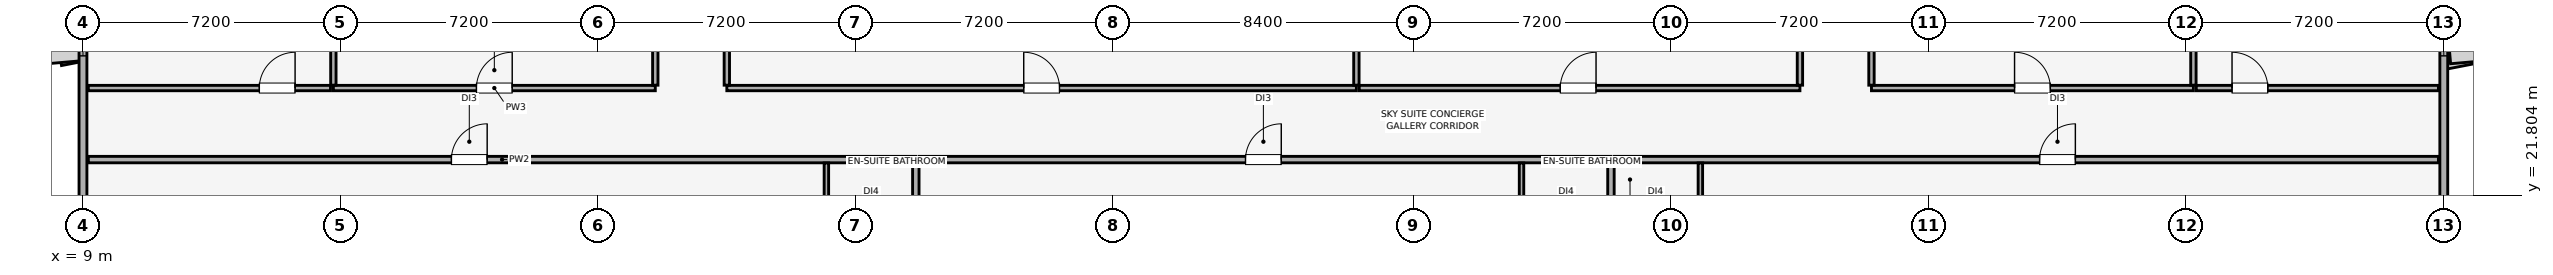
"""IFC4 building model, lengths in metres.
Left out: names, types, materials, properties, quantities, classifications, styles, units other than length and angle.
Written with IfcOpenShell. Run it as: python <this file> out.ifc"""

import sys

from ifc_helpers import new_model, si_unit, direction, frame, frame_2d, origin, place, context, subcontext, project, spatial, rectangle, extrude, element, fill, save


model = new_model("IFC4")
c1 = context("Model", 3, precision=1e-05, world=origin(), true_north=direction((0.0, 1.0)))
c2 = subcontext(c1, "Body", "Model", "MODEL_VIEW")
j1 = project(units=[si_unit("LENGTHUNIT", "METRE"), si_unit("PLANEANGLEUNIT", "RADIAN")], contexts=[c1])
p1 = place(None, origin())
s1 = spatial("IfcSite", under=j1, at=p1, CompositionType="ELEMENT")
p2 = place(p1, origin())
s2 = spatial("IfcBuilding", under=s1, at=p2, CompositionType="ELEMENT")
p3 = place(p2, frame((0.0, 0.0, 290.3)))
s3 = spatial("IfcBuildingStorey", under=s2, at=p3, CompositionType="ELEMENT", Elevation=290.3)
p4 = place(p3, frame((75.0, 10.6, 0.0), z_axis=(0.0, 0.0, 1.0), x_axis=(0.0, 1.0, 0.0)))
e1 = element("IfcWall", 1, at=p4, inside=s3, PredefinedType="SOLIDWALL", context=c2, shape_type="SweptSolid", body=[
    extrude(rectangle(XDim=34.8, YDim=0.22, at=frame_2d((17.4, 0.0))), origin(), (0.0, 0.0, 1.0), 3.22),
])
p5 = place(p4, frame((0.885, 0.0, 0.85)))
e2 = element("IfcOpeningElement", 2, at=p5, cuts=e1, PredefinedType="OPENING", context=c2, shape_type="SweptSolid", body=[
    extrude(rectangle(XDim=2.4, YDim=1.5, at=frame_2d((1.2, 0.75))), frame((0.0, 0.12, 0.0), z_axis=(0.0, -1.0, 0.0), x_axis=(1.0, 0.0, 0.0)), (0.0, 0.0, 1.0), 0.24),
])
p6 = place(p4, frame((6.7, 0.0, 0.85)))
e3 = element("IfcOpeningElement", 3, at=p6, cuts=e1, PredefinedType="OPENING", context=c2, shape_type="SweptSolid", body=[
    extrude(rectangle(XDim=3.6, YDim=1.65, at=frame_2d((1.8, 0.825))), frame((0.0, 0.12, 0.0), z_axis=(0.0, -1.0, 0.0), x_axis=(1.0, 0.0, 0.0)), (0.0, 0.0, 1.0), 0.24),
])
p7 = place(p4, frame((15.1, 0.0, 0.85)))
e4 = element("IfcOpeningElement", 4, at=p7, cuts=e1, PredefinedType="OPENING", context=c2, shape_type="SweptSolid", body=[
    extrude(rectangle(XDim=2.4, YDim=1.5, at=frame_2d((1.2, 0.75))), frame((0.0, 0.12, 0.0), z_axis=(0.0, -1.0, 0.0), x_axis=(1.0, 0.0, 0.0)), (0.0, 0.0, 1.0), 0.24),
])
p8 = place(p4, frame((20.015, 0.0, 0.85)))
e5 = element("IfcOpeningElement", 5, at=p8, cuts=e1, PredefinedType="OPENING", context=c2, shape_type="SweptSolid", body=[
    extrude(rectangle(XDim=3.0, YDim=1.5, at=frame_2d((1.5, 0.75))), frame((0.0, 0.12, 0.0), z_axis=(0.0, -1.0, 0.0), x_axis=(1.0, 0.0, 0.0)), (0.0, 0.0, 1.0), 0.24),
])
p9 = place(p4, frame((24.785, 0.0, 0.85)))
e6 = element("IfcOpeningElement", 6, at=p9, cuts=e1, PredefinedType="OPENING", context=c2, shape_type="SweptSolid", body=[
    extrude(rectangle(XDim=3.0, YDim=1.5, at=frame_2d((1.5, 0.75))), frame((0.0, 0.12, 0.0), z_axis=(0.0, -1.0, 0.0), x_axis=(1.0, 0.0, 0.0)), (0.0, 0.0, 1.0), 0.24),
])
p10 = place(p4, frame((30.215, 0.0, 0.85)))
e7 = element("IfcOpeningElement", 7, at=p10, cuts=e1, PredefinedType="OPENING", context=c2, shape_type="SweptSolid", body=[
    extrude(rectangle(XDim=3.6, YDim=1.65, at=frame_2d((1.8, 0.825))), frame((0.0, 0.12, 0.0), z_axis=(0.0, -1.0, 0.0), x_axis=(1.0, 0.0, 0.0)), (0.0, 0.0, 1.0), 0.24),
])
p11 = place(p3, frame((9.0, 45.4, 0.0), z_axis=(0.0, 0.0, 1.0), x_axis=(0.0, -1.0, 0.0)))
e8 = element("IfcWall", 8, at=p11, inside=s3, PredefinedType="SOLIDWALL", context=c2, shape_type="SweptSolid", body=[
    extrude(rectangle(XDim=34.8, YDim=0.22, at=frame_2d((17.4, 0.0))), origin(), (0.0, 0.0, 1.0), 3.22),
])
p12 = place(p11, frame((31.515, 0.0, 0.85)))
e9 = element("IfcOpeningElement", 9, at=p12, cuts=e8, PredefinedType="OPENING", context=c2, shape_type="SweptSolid", body=[
    extrude(rectangle(XDim=2.4, YDim=1.5, at=frame_2d((1.2, 0.75))), frame((0.0, 0.12, 0.0), z_axis=(0.0, -1.0, 0.0), x_axis=(1.0, 0.0, 0.0)), (0.0, 0.0, 1.0), 0.24),
])
p13 = place(p11, frame((24.5, 0.0, 0.85)))
e10 = element("IfcOpeningElement", 10, at=p13, cuts=e8, PredefinedType="OPENING", context=c2, shape_type="SweptSolid", body=[
    extrude(rectangle(XDim=3.6, YDim=1.65, at=frame_2d((1.8, 0.825))), frame((0.0, 0.12, 0.0), z_axis=(0.0, -1.0, 0.0), x_axis=(1.0, 0.0, 0.0)), (0.0, 0.0, 1.0), 0.24),
])
p14 = place(p11, frame((17.3, 0.0, 0.85)))
e11 = element("IfcOpeningElement", 11, at=p14, cuts=e8, PredefinedType="OPENING", context=c2, shape_type="SweptSolid", body=[
    extrude(rectangle(XDim=2.4, YDim=1.5, at=frame_2d((1.2, 0.75))), frame((0.0, 0.12, 0.0), z_axis=(0.0, -1.0, 0.0), x_axis=(1.0, 0.0, 0.0)), (0.0, 0.0, 1.0), 0.24),
])
p15 = place(p11, frame((11.785, 0.0, 0.85)))
e12 = element("IfcOpeningElement", 12, at=p15, cuts=e8, PredefinedType="OPENING", context=c2, shape_type="SweptSolid", body=[
    extrude(rectangle(XDim=3.0, YDim=1.5, at=frame_2d((1.5, 0.75))), frame((0.0, 0.12, 0.0), z_axis=(0.0, -1.0, 0.0), x_axis=(1.0, 0.0, 0.0)), (0.0, 0.0, 1.0), 0.24),
])
p16 = place(p11, frame((7.015, 0.0, 0.85)))
e13 = element("IfcOpeningElement", 13, at=p16, cuts=e8, PredefinedType="OPENING", context=c2, shape_type="SweptSolid", body=[
    extrude(rectangle(XDim=3.0, YDim=1.5, at=frame_2d((1.5, 0.75))), frame((0.0, 0.12, 0.0), z_axis=(0.0, -1.0, 0.0), x_axis=(1.0, 0.0, 0.0)), (0.0, 0.0, 1.0), 0.24),
])
p17 = place(p11, frame((0.985, 0.0, 0.85)))
e14 = element("IfcOpeningElement", 14, at=p17, cuts=e8, PredefinedType="OPENING", context=c2, shape_type="SweptSolid", body=[
    extrude(rectangle(XDim=3.6, YDim=1.65, at=frame_2d((1.8, 0.825))), frame((0.0, 0.12, 0.0), z_axis=(0.0, -1.0, 0.0), x_axis=(1.0, 0.0, 0.0)), (0.0, 0.0, 1.0), 0.24),
])
p18 = place(p3, frame((9.15, 22.8, 0.0), z_axis=(0.0, 0.0, 1.0), x_axis=(1.0, 0.0, 0.0)))
e15 = element("IfcWall", 15, at=p18, inside=s3, PredefinedType="PARTITIONING", context=c2, shape_type="SweptSolid", body=[
    extrude(rectangle(XDim=23.133, YDim=0.18, at=frame_2d((11.567, 0.0))), origin(), (0.0, 0.0, 1.0), 4.02),
])
p19 = place(p18, frame((10.15, 0.0, 0.0)))
e16 = element("IfcOpeningElement", 16, at=p19, cuts=e15, PredefinedType="OPENING", context=c2, shape_type="SweptSolid", body=[
    extrude(rectangle(XDim=1.0, YDim=2.15, at=frame_2d((0.5, 1.075))), frame((0.0, 0.1, 0.0), z_axis=(0.0, -1.0, 0.0), x_axis=(1.0, 0.0, 0.0)), (0.0, 0.0, 1.0), 0.2),
])
p20 = place(p3, frame((32.283, 7.15, 0.0), z_axis=(0.0, 0.0, 1.0), x_axis=(0.0, 1.0, 0.0)))
e17 = element("IfcWall", 17, at=p20, inside=s3, PredefinedType="PARTITIONING", context=c2, shape_type="SweptSolid", body=[
    extrude(rectangle(XDim=15.555, YDim=0.18, at=frame_2d((7.778, 0.0))), origin(), (0.0, 0.0, 1.0), 4.02),
])
p21 = place(p3, frame((29.783, 20.317, 0.0), z_axis=(0.0, 0.0, 1.0), x_axis=(0.0, 1.0, 0.0)))
e18 = element("IfcWall", 18, at=p21, inside=s3, PredefinedType="PARTITIONING", context=c2, shape_type="SweptSolid", body=[
    extrude(rectangle(XDim=2.388, YDim=0.125, at=frame_2d((1.194, 0.0))), origin(), (0.0, 0.0, 1.0), 4.02),
])
p22 = place(p3, frame((32.378, 22.8, 0.0), z_axis=(0.0, 0.0, 1.0), x_axis=(1.0, 0.0, 0.0)))
e19 = element("IfcWall", 19, at=p22, inside=s3, PredefinedType="PARTITIONING", context=c2, shape_type="SweptSolid", body=[
    extrude(rectangle(XDim=19.338, YDim=0.18, at=frame_2d((9.669, 0.0))), origin(), (0.0, 0.0, 1.0), 4.02),
])
p23 = place(p22, frame((9.122, 0.0, 0.0)))
e20 = element("IfcOpeningElement", 20, at=p23, cuts=e19, PredefinedType="OPENING", context=c2, shape_type="SweptSolid", body=[
    extrude(rectangle(XDim=1.0, YDim=2.15, at=frame_2d((0.5, 1.075))), frame((0.0, 0.1, 0.0), z_axis=(0.0, -1.0, 0.0), x_axis=(1.0, 0.0, 0.0)), (0.0, 0.0, 1.0), 0.2),
])
p24 = place(p3, frame((51.717, 7.15, 0.0), z_axis=(0.0, 0.0, 1.0), x_axis=(0.0, 1.0, 0.0)))
e21 = element("IfcWall", 21, at=p24, inside=s3, PredefinedType="PARTITIONING", context=c2, shape_type="SweptSolid", body=[
    extrude(rectangle(XDim=15.555, YDim=0.18, at=frame_2d((7.778, 0.0))), origin(), (0.0, 0.0, 1.0), 4.02),
])
p25 = place(p3, frame((49.217, 20.317, 0.0), z_axis=(0.0, 0.0, 1.0), x_axis=(0.0, 1.0, 0.0)))
e22 = element("IfcWall", 22, at=p25, inside=s3, PredefinedType="PARTITIONING", context=c2, shape_type="SweptSolid", body=[
    extrude(rectangle(XDim=2.388, YDim=0.125, at=frame_2d((1.194, 0.0))), origin(), (0.0, 0.0, 1.0), 4.02),
])
p26 = place(p3, frame((51.812, 22.8, 0.0), z_axis=(0.0, 0.0, 1.0), x_axis=(1.0, 0.0, 0.0)))
e23 = element("IfcWall", 23, at=p26, inside=s3, PredefinedType="PARTITIONING", context=c2, shape_type="SweptSolid", body=[
    extrude(rectangle(XDim=23.038, YDim=0.18, at=frame_2d((11.519, 0.0))), origin(), (0.0, 0.0, 1.0), 4.02),
])
p27 = place(p26, frame((11.888, 0.0, 0.0)))
e24 = element("IfcOpeningElement", 24, at=p27, cuts=e23, PredefinedType="OPENING", context=c2, shape_type="SweptSolid", body=[
    extrude(rectangle(XDim=1.0, YDim=2.15, at=frame_2d((0.5, 1.075))), frame((0.0, 0.1, 0.0), z_axis=(0.0, -1.0, 0.0), x_axis=(1.0, 0.0, 0.0)), (0.0, 0.0, 1.0), 0.2),
])
p28 = place(p3, frame((54.217, 20.317, 0.0), z_axis=(0.0, 0.0, 1.0), x_axis=(0.0, 1.0, 0.0)))
e25 = element("IfcWall", 25, at=p28, inside=s3, PredefinedType="PARTITIONING", context=c2, shape_type="SweptSolid", body=[
    extrude(rectangle(XDim=2.388, YDim=0.125, at=frame_2d((1.194, 0.0))), origin(), (0.0, 0.0, 1.0), 4.02),
])
p29 = place(p3, frame((16.0, 24.8, 0.0), z_axis=(0.0, 0.0, 1.0), x_axis=(1.0, 0.0, 0.0)))
e26 = element("IfcWall", 26, at=p29, inside=s3, PredefinedType="PARTITIONING", context=c2, shape_type="SweptSolid", body=[
    extrude(rectangle(XDim=9.0, YDim=0.15, at=frame_2d((4.5, 0.0))), origin(), (0.0, 0.0, 1.0), 4.02),
])
p30 = place(p29, frame((4.0, 0.0, 0.0)))
e27 = element("IfcOpeningElement", 27, at=p30, cuts=e26, PredefinedType="OPENING", context=c2, shape_type="SweptSolid", body=[
    extrude(rectangle(XDim=1.0, YDim=2.15, at=frame_2d((0.5, 1.075))), frame((0.0, 0.085, 0.0), z_axis=(0.0, -1.0, 0.0), x_axis=(1.0, 0.0, 0.0)), (0.0, 0.0, 1.0), 0.17),
])
p31 = place(p3, frame((16.0, 24.88, 0.0), z_axis=(0.0, 0.0, 1.0), x_axis=(0.0, 1.0, 0.0)))
e28 = element("IfcWall", 28, at=p31, inside=s3, PredefinedType="PARTITIONING", context=c2, shape_type="SweptSolid", body=[
    extrude(rectangle(XDim=4.51, YDim=0.15, at=frame_2d((2.255, 0.0))), origin(), (0.0, 0.0, 1.0), 3.66),
])
p32 = place(p3, frame((25.0, 24.88, 0.0), z_axis=(0.0, 0.0, 1.0), x_axis=(0.0, 1.0, 0.0)))
e29 = element("IfcWall", 29, at=p32, inside=s3, PredefinedType="PARTITIONING", context=c2, shape_type="SweptSolid", body=[
    extrude(rectangle(XDim=4.44, YDim=0.15, at=frame_2d((2.22, 0.0))), origin(), (0.0, 0.0, 1.0), 4.02),
])
p33 = place(p3, frame((27.0, 24.8, 0.0), z_axis=(0.0, 0.0, 1.0), x_axis=(1.0, 0.0, 0.0)))
e30 = element("IfcWall", 30, at=p33, inside=s3, PredefinedType="PARTITIONING", context=c2, shape_type="SweptSolid", body=[
    extrude(rectangle(XDim=17.6, YDim=0.15, at=frame_2d((8.8, 0.0))), origin(), (0.0, 0.0, 1.0), 4.02),
])
p34 = place(p33, frame((8.3, 0.0, 0.0)))
e31 = element("IfcOpeningElement", 31, at=p34, cuts=e30, PredefinedType="OPENING", context=c2, shape_type="SweptSolid", body=[
    extrude(rectangle(XDim=1.0, YDim=2.15, at=frame_2d((0.5, 1.075))), frame((0.0, 0.085, 0.0), z_axis=(0.0, -1.0, 0.0), x_axis=(1.0, 0.0, 0.0)), (0.0, 0.0, 1.0), 0.17),
])
p35 = place(p3, frame((27.0, 24.88, 0.0), z_axis=(0.0, 0.0, 1.0), x_axis=(0.0, 1.0, 0.0)))
e32 = element("IfcWall", 32, at=p35, inside=s3, PredefinedType="PARTITIONING", context=c2, shape_type="SweptSolid", body=[
    extrude(rectangle(XDim=4.44, YDim=0.15, at=frame_2d((2.22, 0.0))), origin(), (0.0, 0.0, 1.0), 3.66),
])
p36 = place(p3, frame((44.6, 24.88, 0.0), z_axis=(0.0, 0.0, 1.0), x_axis=(0.0, 1.0, 0.0)))
e33 = element("IfcWall", 33, at=p36, inside=s3, PredefinedType="PARTITIONING", context=c2, shape_type="SweptSolid", body=[
    extrude(rectangle(XDim=4.44, YDim=0.15, at=frame_2d((2.22, 0.0))), origin(), (0.0, 0.0, 1.0), 4.02),
])
p37 = place(p3, frame((44.68, 24.8, 0.0), z_axis=(0.0, 0.0, 1.0), x_axis=(1.0, 0.0, 0.0)))
e34 = element("IfcWall", 34, at=p37, inside=s3, PredefinedType="PARTITIONING", context=c2, shape_type="SweptSolid", body=[
    extrude(rectangle(XDim=12.32, YDim=0.15, at=frame_2d((6.16, 0.0))), origin(), (0.0, 0.0, 1.0), 4.02),
])
p38 = place(p37, frame((5.62, 0.0, 0.0)))
e35 = element("IfcOpeningElement", 35, at=p38, cuts=e34, PredefinedType="OPENING", context=c2, shape_type="SweptSolid", body=[
    extrude(rectangle(XDim=1.0, YDim=2.15, at=frame_2d((0.5, 1.075))), frame((0.0, 0.085, 0.0), z_axis=(0.0, -1.0, 0.0), x_axis=(1.0, 0.0, 0.0)), (0.0, 0.0, 1.0), 0.17),
])
p39 = place(p3, frame((57.0, 24.88, 0.0), z_axis=(0.0, 0.0, 1.0), x_axis=(0.0, 1.0, 0.0)))
e36 = element("IfcWall", 36, at=p39, inside=s3, PredefinedType="PARTITIONING", context=c2, shape_type="SweptSolid", body=[
    extrude(rectangle(XDim=4.44, YDim=0.15, at=frame_2d((2.22, 0.0))), origin(), (0.0, 0.0, 1.0), 3.66),
])
p40 = place(p3, frame((59.0, 24.8, 0.0), z_axis=(0.0, 0.0, 1.0), x_axis=(1.0, 0.0, 0.0)))
e37 = element("IfcWall", 37, at=p40, inside=s3, PredefinedType="PARTITIONING", context=c2, shape_type="SweptSolid", body=[
    extrude(rectangle(XDim=9.0, YDim=0.15, at=frame_2d((4.5, 0.0))), origin(), (0.0, 0.0, 1.0), 4.02),
])
p41 = place(p40, frame((4.0, 0.0, 0.0)))
e38 = element("IfcOpeningElement", 38, at=p41, cuts=e37, PredefinedType="OPENING", context=c2, shape_type="SweptSolid", body=[
    extrude(rectangle(XDim=1.0, YDim=2.15, at=frame_2d((0.5, 1.075))), frame((0.0, 0.085, 0.0), z_axis=(0.0, -1.0, 0.0), x_axis=(1.0, 0.0, 0.0)), (0.0, 0.0, 1.0), 0.17),
])
p42 = place(p3, frame((59.0, 24.88, 0.0), z_axis=(0.0, 0.0, 1.0), x_axis=(0.0, 1.0, 0.0)))
e39 = element("IfcWall", 39, at=p42, inside=s3, PredefinedType="PARTITIONING", context=c2, shape_type="SweptSolid", body=[
    extrude(rectangle(XDim=4.44, YDim=0.15, at=frame_2d((2.22, 0.0))), origin(), (0.0, 0.0, 1.0), 4.02),
])
p43 = place(p3, frame((68.0, 24.88, 0.0), z_axis=(0.0, 0.0, 1.0), x_axis=(0.0, 1.0, 0.0)))
e40 = element("IfcWall", 40, at=p43, inside=s3, PredefinedType="PARTITIONING", context=c2, shape_type="SweptSolid", body=[
    extrude(rectangle(XDim=4.51, YDim=0.15, at=frame_2d((2.255, 0.0))), origin(), (0.0, 0.0, 1.0), 3.66),
])
p44 = place(p3, frame((9.15, 24.8, 0.0), z_axis=(0.0, 0.0, 1.0), x_axis=(1.0, 0.0, 0.0)))
e41 = element("IfcWall", 41, at=p44, inside=s3, PredefinedType="PARTITIONING", context=c2, shape_type="SweptSolid", body=[
    extrude(rectangle(XDim=6.77, YDim=0.15, at=frame_2d((3.385, 0.0))), origin(), (0.0, 0.0, 1.0), 4.02),
])
p45 = place(p44, frame((4.78, 0.0, 0.0)))
e42 = element("IfcOpeningElement", 42, at=p45, cuts=e41, PredefinedType="OPENING", context=c2, shape_type="SweptSolid", body=[
    extrude(rectangle(XDim=1.0, YDim=2.15, at=frame_2d((0.5, 1.075))), frame((0.0, 0.085, 0.0), z_axis=(0.0, -1.0, 0.0), x_axis=(1.0, 0.0, 0.0)), (0.0, 0.0, 1.0), 0.17),
])
p46 = place(p3, frame((68.08, 24.8, 0.0), z_axis=(0.0, 0.0, 1.0), x_axis=(1.0, 0.0, 0.0)))
e43 = element("IfcWall", 43, at=p46, inside=s3, PredefinedType="PARTITIONING", context=c2, shape_type="SweptSolid", body=[
    extrude(rectangle(XDim=6.77, YDim=0.15, at=frame_2d((3.385, 0.0))), origin(), (0.0, 0.0, 1.0), 4.02),
])
p47 = place(p46, frame((1.0, 0.0, 0.0)))
e44 = element("IfcOpeningElement", 44, at=p47, cuts=e43, PredefinedType="OPENING", context=c2, shape_type="SweptSolid", body=[
    extrude(rectangle(XDim=1.0, YDim=2.15, at=frame_2d((0.5, 1.075))), frame((0.0, 0.085, 0.0), z_axis=(0.0, -1.0, 0.0), x_axis=(1.0, 0.0, 0.0)), (0.0, 0.0, 1.0), 0.17),
])
p48 = place(p7, origin())
e45 = element("IfcWindow", 45, at=p48, inside=s3, PartitioningType="SINGLE_PANEL", PredefinedType="WINDOW", context=c2, shape_type="SweptSolid", body=[
    extrude(rectangle(XDim=2.4, YDim=1.5, at=frame_2d((1.2, 0.75))), frame((0.0, 0.03, 0.0), z_axis=(0.0, -1.0, 0.0), x_axis=(1.0, 0.0, 0.0)), (0.0, 0.0, 1.0), 0.06),
])
fill(e4, e45)
p49 = place(p14, origin())
e46 = element("IfcWindow", 46, at=p49, inside=s3, PartitioningType="SINGLE_PANEL", PredefinedType="WINDOW", context=c2, shape_type="SweptSolid", body=[
    extrude(rectangle(XDim=2.4, YDim=1.5, at=frame_2d((1.2, 0.75))), frame((0.0, 0.03, 0.0), z_axis=(0.0, -1.0, 0.0), x_axis=(1.0, 0.0, 0.0)), (0.0, 0.0, 1.0), 0.06),
])
fill(e11, e46)
p50 = place(p19, origin())
e47 = element("IfcDoor", 47, at=p50, inside=s3, OperationType="SINGLE_SWING_RIGHT", PredefinedType="DOOR", context=c2, shape_type="SweptSolid", body=[
    extrude(rectangle(XDim=1.0, YDim=2.15, at=frame_2d((0.5, 1.075))), frame((0.0, 0.025, 0.0), z_axis=(0.0, -1.0, 0.0), x_axis=(1.0, 0.0, 0.0)), (0.0, 0.0, 1.0), 0.05),
])
fill(e16, e47)
p51 = place(p23, origin())
e48 = element("IfcDoor", 48, at=p51, inside=s3, OperationType="SINGLE_SWING_RIGHT", PredefinedType="DOOR", context=c2, shape_type="SweptSolid", body=[
    extrude(rectangle(XDim=1.0, YDim=2.15, at=frame_2d((0.5, 1.075))), frame((0.0, 0.025, 0.0), z_axis=(0.0, -1.0, 0.0), x_axis=(1.0, 0.0, 0.0)), (0.0, 0.0, 1.0), 0.05),
])
fill(e20, e48)
p52 = place(p27, origin())
e49 = element("IfcDoor", 49, at=p52, inside=s3, OperationType="SINGLE_SWING_RIGHT", PredefinedType="DOOR", context=c2, shape_type="SweptSolid", body=[
    extrude(rectangle(XDim=1.0, YDim=2.15, at=frame_2d((0.5, 1.075))), frame((0.0, 0.025, 0.0), z_axis=(0.0, -1.0, 0.0), x_axis=(1.0, 0.0, 0.0)), (0.0, 0.0, 1.0), 0.05),
])
fill(e24, e49)
p53 = place(p30, origin())
e50 = element("IfcDoor", 50, at=p53, inside=s3, OperationType="SINGLE_SWING_RIGHT", PredefinedType="DOOR", context=c2, shape_type="SweptSolid", body=[
    extrude(rectangle(XDim=1.0, YDim=2.15, at=frame_2d((0.5, 1.075))), frame((0.0, 0.025, 0.0), z_axis=(0.0, -1.0, 0.0), x_axis=(1.0, 0.0, 0.0)), (0.0, 0.0, 1.0), 0.05),
])
fill(e27, e50)
p54 = place(p34, origin())
e51 = element("IfcDoor", 51, at=p54, inside=s3, OperationType="SINGLE_SWING_LEFT", PredefinedType="DOOR", context=c2, shape_type="SweptSolid", body=[
    extrude(rectangle(XDim=1.0, YDim=2.15, at=frame_2d((0.5, 1.075))), frame((0.0, 0.025, 0.0), z_axis=(0.0, -1.0, 0.0), x_axis=(1.0, 0.0, 0.0)), (0.0, 0.0, 1.0), 0.05),
])
fill(e31, e51)
p55 = place(p38, origin())
e52 = element("IfcDoor", 52, at=p55, inside=s3, OperationType="SINGLE_SWING_RIGHT", PredefinedType="DOOR", context=c2, shape_type="SweptSolid", body=[
    extrude(rectangle(XDim=1.0, YDim=2.15, at=frame_2d((0.5, 1.075))), frame((0.0, 0.025, 0.0), z_axis=(0.0, -1.0, 0.0), x_axis=(1.0, 0.0, 0.0)), (0.0, 0.0, 1.0), 0.05),
])
fill(e35, e52)
p56 = place(p41, origin())
e53 = element("IfcDoor", 53, at=p56, inside=s3, OperationType="SINGLE_SWING_LEFT", PredefinedType="DOOR", context=c2, shape_type="SweptSolid", body=[
    extrude(rectangle(XDim=1.0, YDim=2.15, at=frame_2d((0.5, 1.075))), frame((0.0, 0.025, 0.0), z_axis=(0.0, -1.0, 0.0), x_axis=(1.0, 0.0, 0.0)), (0.0, 0.0, 1.0), 0.05),
])
fill(e38, e53)
p57 = place(p45, origin())
e54 = element("IfcDoor", 54, at=p57, inside=s3, OperationType="SINGLE_SWING_RIGHT", PredefinedType="DOOR", context=c2, shape_type="SweptSolid", body=[
    extrude(rectangle(XDim=1.0, YDim=2.15, at=frame_2d((0.5, 1.075))), frame((0.0, 0.025, 0.0), z_axis=(0.0, -1.0, 0.0), x_axis=(1.0, 0.0, 0.0)), (0.0, 0.0, 1.0), 0.05),
])
fill(e42, e54)
p58 = place(p47, origin())
e55 = element("IfcDoor", 55, at=p58, inside=s3, OperationType="SINGLE_SWING_LEFT", PredefinedType="DOOR", context=c2, shape_type="SweptSolid", body=[
    extrude(rectangle(XDim=1.0, YDim=2.15, at=frame_2d((0.5, 1.075))), frame((0.0, 0.025, 0.0), z_axis=(0.0, -1.0, 0.0), x_axis=(1.0, 0.0, 0.0)), (0.0, 0.0, 1.0), 0.05),
])
fill(e44, e55)
save(model, sys.argv[1])
